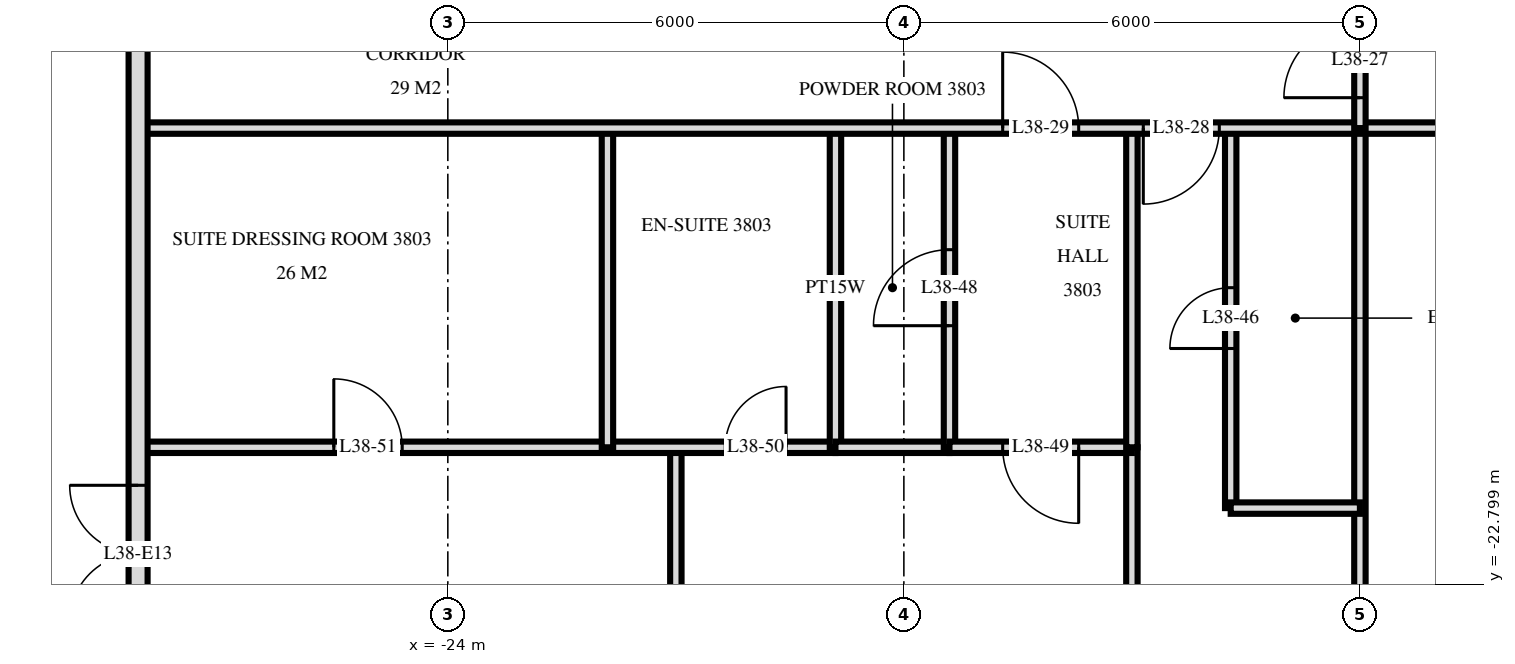
"""IFC4 building model, lengths in metres.
Left out: names, types, materials, properties, quantities, classifications, styles, units other than length and angle.
Written with IfcOpenShell. Run it as: python <this file> out.ifc"""

import sys

from ifc_helpers import new_model, si_unit, direction, frame, frame_2d, origin, place, context, subcontext, project, spatial, rectangle, extrude, element, fill, save


model = new_model("IFC4")
c1 = context("Model", 3, precision=1e-05, world=origin(), true_north=direction((0.0, 1.0)))
c2 = subcontext(c1, "Body", "Model", "MODEL_VIEW")
j1 = project(units=[si_unit("LENGTHUNIT", "METRE"), si_unit("PLANEANGLEUNIT", "RADIAN")], contexts=[c1])
p1 = place(None, origin())
s1 = spatial("IfcSite", under=j1, at=p1, CompositionType="ELEMENT")
p2 = place(p1, origin())
s2 = spatial("IfcBuilding", under=s1, at=p2, CompositionType="ELEMENT")
p3 = place(p2, frame((0.0, 0.0, 148.8)))
s3 = spatial("IfcBuildingStorey", under=s2, at=p3, CompositionType="ELEMENT", Elevation=148.8)
p4 = place(p3, frame((-28.075, -3.325, 0.0), z_axis=(0.0, 0.0, 1.0), x_axis=(0.0, -1.0, 0.0)))
e1 = element("IfcWall", 1, at=p4, inside=s3, PredefinedType="SOLIDWALL", context=c2, shape_type="SweptSolid", body=[
    extrude(rectangle(XDim=25.951, YDim=0.25, at=frame_2d((12.975, 0.0))), origin(), (0.0, 0.0, 1.0), 3.32),
])
p5 = place(p4, frame((7.275, 0.0, 0.0)))
e2 = element("IfcOpeningElement", 2, at=p5, cuts=e1, PredefinedType="OPENING", context=c2, shape_type="SweptSolid", body=[
    extrude(rectangle(XDim=1.8, YDim=2.4, at=frame_2d((0.9, 1.2))), frame((0.0, 0.135, 0.0), z_axis=(0.0, -1.0, 0.0), x_axis=(1.0, 0.0, 0.0)), (0.0, 0.0, 1.0), 0.27),
])
p6 = place(p4, frame((18.175, 0.0, 0.0)))
e3 = element("IfcOpeningElement", 3, at=p6, cuts=e1, PredefinedType="OPENING", context=c2, shape_type="SweptSolid", body=[
    extrude(rectangle(XDim=1.8, YDim=2.4, at=frame_2d((0.9, 1.2))), frame((0.0, 0.135, 0.0), z_axis=(0.0, -1.0, 0.0), x_axis=(1.0, 0.0, 0.0)), (0.0, 0.0, 1.0), 0.27),
])
p7 = place(p4, frame((21.075, 0.0, 0.0)))
e4 = element("IfcOpeningElement", 4, at=p7, cuts=e1, PredefinedType="OPENING", context=c2, shape_type="SweptSolid", body=[
    extrude(rectangle(XDim=1.8, YDim=2.4, at=frame_2d((0.9, 1.2))), frame((0.0, 0.135, 0.0), z_axis=(0.0, -1.0, 0.0), x_axis=(1.0, 0.0, 0.0)), (0.0, 0.0, 1.0), 0.27),
])
p8 = place(p4, frame((23.825, 0.0, 0.3)))
e5 = element("IfcOpeningElement", 5, at=p8, cuts=e1, PredefinedType="OPENING", context=c2, shape_type="SweptSolid", body=[
    extrude(rectangle(XDim=1.8, YDim=2.1, at=frame_2d((0.9, 1.05))), frame((0.0, 0.135, 0.0), z_axis=(0.0, -1.0, 0.0), x_axis=(1.0, 0.0, 0.0)), (0.0, 0.0, 1.0), 0.27),
])
p9 = place(p3, frame((-12.0, -16.8, 0.0), z_axis=(0.0, 0.0, 1.0), x_axis=(0.0, 1.0, 0.0)))
e6 = element("IfcWall", 6, at=p9, inside=s3, PredefinedType="PARTITIONING", context=c2, shape_type="SweptSolid", body=[
    extrude(rectangle(XDim=1.75, YDim=0.15, at=frame_2d((0.875, 0.0))), origin(), (0.0, 0.0, 1.0), 3.32),
])
p10 = place(p9, frame((0.4, 0.0, 0.0)))
e7 = element("IfcOpeningElement", 7, at=p10, cuts=e6, PredefinedType="OPENING", context=c2, shape_type="SweptSolid", body=[
    extrude(rectangle(XDim=1.0, YDim=2.1, at=frame_2d((0.5, 1.05))), frame((0.0, 0.085, 0.0), z_axis=(0.0, -1.0, 0.0), x_axis=(1.0, 0.0, 0.0)), (0.0, 0.0, 1.0), 0.17),
])
p11 = place(p3, frame((-12.0, -33.62, 0.0), z_axis=(0.0, 0.0, 1.0), x_axis=(0.0, 1.0, 0.0)))
e8 = element("IfcWall", 8, at=p11, inside=s3, PredefinedType="PARTITIONING", context=c2, shape_type="SweptSolid", body=[
    extrude(rectangle(XDim=16.82, YDim=0.15, at=frame_2d((8.41, 0.0))), origin(), (0.0, 0.0, 1.0), 3.32),
])
p12 = place(p3, frame((-13.7, -21.8, 0.0), z_axis=(0.0, 0.0, 1.0), x_axis=(0.0, 1.0, 0.0)))
e9 = element("IfcWall", 9, at=p12, inside=s3, PredefinedType="PARTITIONING", context=c2, shape_type="SweptSolid", body=[
    extrude(rectangle(XDim=5.0, YDim=0.15, at=frame_2d((2.5, 0.0))), origin(), (0.0, 0.0, 1.0), 3.32),
])
p13 = place(p12, frame((2.1, 0.0, 0.0)))
e10 = element("IfcOpeningElement", 10, at=p13, cuts=e9, PredefinedType="OPENING", context=c2, shape_type="SweptSolid", body=[
    extrude(rectangle(XDim=0.8, YDim=2.1, at=frame_2d((0.4, 1.05))), frame((0.0, 0.085, 0.0), z_axis=(0.0, -1.0, 0.0), x_axis=(1.0, 0.0, 0.0)), (0.0, 0.0, 1.0), 0.17),
])
p14 = place(p3, frame((-15.0, -21.0, 0.0), z_axis=(0.0, 0.0, 1.0), x_axis=(0.0, 1.0, 0.0)))
e11 = element("IfcWall", 11, at=p14, inside=s3, PredefinedType="PARTITIONING", context=c2, shape_type="SweptSolid", body=[
    extrude(rectangle(XDim=4.2, YDim=0.15, at=frame_2d((2.1, 0.0))), origin(), (0.0, 0.0, 1.0), 3.32),
])
p15 = place(p3, frame((-15.0, -33.62, 0.0), z_axis=(0.0, 0.0, 1.0), x_axis=(0.0, 1.0, 0.0)))
e12 = element("IfcWall", 12, at=p15, inside=s3, PredefinedType="PARTITIONING", context=c2, shape_type="SweptSolid", body=[
    extrude(rectangle(XDim=12.62, YDim=0.15, at=frame_2d((6.31, 0.0))), origin(), (0.0, 0.0, 1.0), 3.32),
])
p16 = place(p3, frame((-17.4, -21.0, 0.0), z_axis=(0.0, 0.0, 1.0), x_axis=(0.0, 1.0, 0.0)))
e13 = element("IfcWall", 13, at=p16, inside=s3, PredefinedType="PARTITIONING", context=c2, shape_type="SweptSolid", body=[
    extrude(rectangle(XDim=4.2, YDim=0.15, at=frame_2d((2.1, 0.0))), origin(), (0.0, 0.0, 1.0), 3.32),
])
p17 = place(p16, frame((1.6, 0.0, 0.0)))
e14 = element("IfcOpeningElement", 14, at=p17, cuts=e13, PredefinedType="OPENING", context=c2, shape_type="SweptSolid", body=[
    extrude(rectangle(XDim=1.0, YDim=2.1, at=frame_2d((0.5, 1.05))), frame((0.0, 0.085, 0.0), z_axis=(0.0, -1.0, 0.0), x_axis=(1.0, 0.0, 0.0)), (0.0, 0.0, 1.0), 0.17),
])
p18 = place(p3, frame((-18.9, -21.0, 0.0), z_axis=(0.0, 0.0, 1.0), x_axis=(0.0, 1.0, 0.0)))
e15 = element("IfcWall", 15, at=p18, inside=s3, PredefinedType="PLUMBINGWALL", context=c2, shape_type="SweptSolid", body=[
    extrude(rectangle(XDim=4.2, YDim=0.15, at=frame_2d((2.1, 0.0))), origin(), (0.0, 0.0, 1.0), 3.32),
])
p19 = place(p3, frame((-21.0, -33.62, 0.0), z_axis=(0.0, 0.0, 1.0), x_axis=(0.0, 1.0, 0.0)))
e16 = element("IfcWall", 16, at=p19, inside=s3, PredefinedType="PARTITIONING", context=c2, shape_type="SweptSolid", body=[
    extrude(rectangle(XDim=12.62, YDim=0.15, at=frame_2d((6.31, 0.0))), origin(), (0.0, 0.0, 1.0), 3.32),
])
p20 = place(p19, frame((5.77, 0.0, 0.0)))
e17 = element("IfcOpeningElement", 17, at=p20, cuts=e16, PredefinedType="OPENING", context=c2, shape_type="SweptSolid", body=[
    extrude(rectangle(XDim=0.9, YDim=2.1, at=frame_2d((0.45, 1.05))), frame((0.0, 0.085, 0.0), z_axis=(0.0, -1.0, 0.0), x_axis=(1.0, 0.0, 0.0)), (0.0, 0.0, 1.0), 0.17),
])
p21 = place(p3, frame((-21.9, -21.0, 0.0), z_axis=(0.0, 0.0, 1.0), x_axis=(0.0, 1.0, 0.0)))
e18 = element("IfcWall", 18, at=p21, inside=s3, PredefinedType="PARTITIONING", context=c2, shape_type="SweptSolid", body=[
    extrude(rectangle(XDim=4.2, YDim=0.15, at=frame_2d((2.1, 0.0))), origin(), (0.0, 0.0, 1.0), 3.32),
])
p22 = place(p3, frame((-13.7, -21.8, 0.0), z_axis=(0.0, 0.0, 1.0), x_axis=(1.0, 0.0, 0.0)))
e19 = element("IfcWall", 19, at=p22, inside=s3, PredefinedType="PARTITIONING", context=c2, shape_type="SweptSolid", body=[
    extrude(rectangle(XDim=1.7, YDim=0.15, at=frame_2d((0.85, 0.0))), origin(), (0.0, 0.0, 1.0), 3.32),
])
p23 = place(p3, frame((-17.4, -21.0, 0.0), z_axis=(0.0, 0.0, 1.0), x_axis=(1.0, 0.0, 0.0)))
e20 = element("IfcWall", 20, at=p23, inside=s3, PredefinedType="PARTITIONING", context=c2, shape_type="SweptSolid", body=[
    extrude(rectangle(XDim=2.4, YDim=0.15, at=frame_2d((1.2, 0.0))), origin(), (0.0, 0.0, 1.0), 3.32),
])
p24 = place(p23, frame((0.7, 0.0, 0.0)))
e21 = element("IfcOpeningElement", 21, at=p24, cuts=e20, PredefinedType="OPENING", context=c2, shape_type="SweptSolid", body=[
    extrude(rectangle(XDim=1.0, YDim=2.1, at=frame_2d((0.5, 1.05))), frame((0.0, 0.085, 0.0), z_axis=(0.0, -1.0, 0.0), x_axis=(1.0, 0.0, 0.0)), (0.0, 0.0, 1.0), 0.17),
])
p25 = place(p3, frame((-28.02, -21.0, 0.0), z_axis=(0.0, 0.0, 1.0), x_axis=(1.0, 0.0, 0.0)))
e22 = element("IfcWall", 22, at=p25, inside=s3, PredefinedType="PARTITIONING", context=c2, shape_type="SweptSolid", body=[
    extrude(rectangle(XDim=9.12, YDim=0.15, at=frame_2d((4.56, 0.0))), origin(), (0.0, 0.0, 1.0), 3.32),
])
p26 = place(p25, frame((7.67, 0.0, 0.0)))
e23 = element("IfcOpeningElement", 23, at=p26, cuts=e22, PredefinedType="OPENING", context=c2, shape_type="SweptSolid", body=[
    extrude(rectangle(XDim=0.8, YDim=2.1, at=frame_2d((0.4, 1.05))), frame((0.0, 0.085, 0.0), z_axis=(0.0, -1.0, 0.0), x_axis=(1.0, 0.0, 0.0)), (0.0, 0.0, 1.0), 0.17),
])
p27 = place(p25, frame((2.52, 0.0, 0.0)))
e24 = element("IfcOpeningElement", 24, at=p27, cuts=e22, PredefinedType="OPENING", context=c2, shape_type="SweptSolid", body=[
    extrude(rectangle(XDim=0.9, YDim=2.1, at=frame_2d((0.45, 1.05))), frame((0.0, 0.085, 0.0), z_axis=(0.0, -1.0, 0.0), x_axis=(1.0, 0.0, 0.0)), (0.0, 0.0, 1.0), 0.17),
])
p28 = place(p3, frame((-18.9, -21.0, 0.0), z_axis=(0.0, 0.0, 1.0), x_axis=(1.0, 0.0, 0.0)))
e25 = element("IfcWall", 25, at=p28, inside=s3, PredefinedType="PLUMBINGWALL", context=c2, shape_type="SweptSolid", body=[
    extrude(rectangle(XDim=1.5, YDim=0.15, at=frame_2d((0.75, 0.0))), origin(), (0.0, 0.0, 1.0), 3.32),
])
p29 = place(p3, frame((-28.02, -16.8, 0.0), z_axis=(0.0, 0.0, 1.0), x_axis=(1.0, 0.0, 0.0)))
e26 = element("IfcWall", 26, at=p29, inside=s3, PredefinedType="PARTITIONING", context=c2, shape_type="SweptSolid", body=[
    extrude(rectangle(XDim=56.04, YDim=0.15, at=frame_2d((28.02, 0.0))), origin(), (0.0, 0.0, 1.0), 3.32),
])
p30 = place(p29, frame((13.17, 0.0, 0.0)))
e27 = element("IfcOpeningElement", 27, at=p30, cuts=e26, PredefinedType="OPENING", context=c2, shape_type="SweptSolid", body=[
    extrude(rectangle(XDim=1.0, YDim=2.1, at=frame_2d((0.5, 1.05))), frame((0.0, 0.085, 0.0), z_axis=(0.0, -1.0, 0.0), x_axis=(1.0, 0.0, 0.0)), (0.0, 0.0, 1.0), 0.17),
])
p31 = place(p29, frame((11.32, 0.0, 0.0)))
e28 = element("IfcOpeningElement", 28, at=p31, cuts=e26, PredefinedType="OPENING", context=c2, shape_type="SweptSolid", body=[
    extrude(rectangle(XDim=1.0, YDim=2.1, at=frame_2d((0.5, 1.05))), frame((0.0, 0.085, 0.0), z_axis=(0.0, -1.0, 0.0), x_axis=(1.0, 0.0, 0.0)), (0.0, 0.0, 1.0), 0.17),
])
p32 = place(p29, frame((41.87, 0.0, 0.0)))
e29 = element("IfcOpeningElement", 29, at=p32, cuts=e26, PredefinedType="OPENING", context=c2, shape_type="SweptSolid", body=[
    extrude(rectangle(XDim=1.0, YDim=2.1, at=frame_2d((0.5, 1.05))), frame((0.0, 0.085, 0.0), z_axis=(0.0, -1.0, 0.0), x_axis=(1.0, 0.0, 0.0)), (0.0, 0.0, 1.0), 0.17),
])
p33 = place(p29, frame((43.72, 0.0, 0.0)))
e30 = element("IfcOpeningElement", 30, at=p33, cuts=e26, PredefinedType="OPENING", context=c2, shape_type="SweptSolid", body=[
    extrude(rectangle(XDim=1.0, YDim=2.1, at=frame_2d((0.5, 1.05))), frame((0.0, 0.085, 0.0), z_axis=(0.0, -1.0, 0.0), x_axis=(1.0, 0.0, 0.0)), (0.0, 0.0, 1.0), 0.17),
])
p34 = place(p29, frame((19.52, 0.0, 0.0)))
e31 = element("IfcOpeningElement", 31, at=p34, cuts=e26, PredefinedType="OPENING", context=c2, shape_type="SweptSolid", body=[
    extrude(rectangle(XDim=1.0, YDim=2.1, at=frame_2d((0.5, 1.05))), frame((0.0, 0.085, 0.0), z_axis=(0.0, -1.0, 0.0), x_axis=(1.0, 0.0, 0.0)), (0.0, 0.0, 1.0), 0.17),
])
p35 = place(p29, frame((27.52, 0.0, 0.0)))
e32 = element("IfcOpeningElement", 32, at=p35, cuts=e26, PredefinedType="OPENING", context=c2, shape_type="SweptSolid", body=[
    extrude(rectangle(XDim=1.0, YDim=2.1, at=frame_2d((0.5, 1.05))), frame((0.0, 0.085, 0.0), z_axis=(0.0, -1.0, 0.0), x_axis=(1.0, 0.0, 0.0)), (0.0, 0.0, 1.0), 0.17),
])
p36 = place(p29, frame((35.52, 0.0, 0.0)))
e33 = element("IfcOpeningElement", 33, at=p36, cuts=e26, PredefinedType="OPENING", context=c2, shape_type="SweptSolid", body=[
    extrude(rectangle(XDim=1.0, YDim=2.1, at=frame_2d((0.5, 1.05))), frame((0.0, 0.085, 0.0), z_axis=(0.0, -1.0, 0.0), x_axis=(1.0, 0.0, 0.0)), (0.0, 0.0, 1.0), 0.17),
])
p37 = place(p6, frame((0.9, 0.0, 0.0), z_axis=(0.0, 0.0, 1.0), x_axis=(-1.0, 0.0, 0.0)))
e34 = element("IfcDoor", 34, at=p37, inside=s3, OperationType="DOUBLE_DOOR_SINGLE_SWING", PredefinedType="DOOR", context=c2, shape_type="SweptSolid", body=[
    extrude(rectangle(XDim=1.8, YDim=2.4, at=frame_2d((0.0, 1.2))), frame((0.0, -0.025, 0.0), z_axis=(0.0, 1.0, 0.0), x_axis=(-1.0, 0.0, 0.0)), (0.0, 0.0, 1.0), 0.05),
])
fill(e3, e34)
p38 = place(p10, origin())
e35 = element("IfcDoor", 35, at=p38, inside=s3, OperationType="SINGLE_SWING_RIGHT", PredefinedType="DOOR", context=c2, shape_type="SweptSolid", body=[
    extrude(rectangle(XDim=1.0, YDim=2.1, at=frame_2d((0.5, 1.05))), frame((0.0, 0.025, 0.0), z_axis=(0.0, -1.0, 0.0), x_axis=(1.0, 0.0, 0.0)), (0.0, 0.0, 1.0), 0.05),
])
fill(e7, e35)
p39 = place(p30, frame((0.5, 0.0, 0.0), z_axis=(0.0, 0.0, 1.0), x_axis=(-1.0, 0.0, 0.0)))
e36 = element("IfcDoor", 36, at=p39, inside=s3, OperationType="SINGLE_SWING_LEFT", PredefinedType="DOOR", context=c2, shape_type="SweptSolid", body=[
    extrude(rectangle(XDim=1.0, YDim=2.1, at=frame_2d((0.0, 1.05))), frame((0.0, -0.025, 0.0), z_axis=(0.0, 1.0, 0.0), x_axis=(-1.0, 0.0, 0.0)), (0.0, 0.0, 1.0), 0.05),
])
fill(e27, e36)
p40 = place(p31, origin())
e37 = element("IfcDoor", 37, at=p40, inside=s3, OperationType="SINGLE_SWING_RIGHT", PredefinedType="DOOR", context=c2, shape_type="SweptSolid", body=[
    extrude(rectangle(XDim=1.0, YDim=2.1, at=frame_2d((0.5, 1.05))), frame((0.0, 0.025, 0.0), z_axis=(0.0, -1.0, 0.0), x_axis=(1.0, 0.0, 0.0)), (0.0, 0.0, 1.0), 0.05),
])
fill(e28, e37)
p41 = place(p13, origin())
e38 = element("IfcDoor", 38, at=p41, inside=s3, OperationType="SINGLE_SWING_RIGHT", PredefinedType="DOOR", context=c2, shape_type="SweptSolid", body=[
    extrude(rectangle(XDim=0.8, YDim=2.1, at=frame_2d((0.4, 1.05))), frame((0.0, 0.025, 0.0), z_axis=(0.0, -1.0, 0.0), x_axis=(1.0, 0.0, 0.0)), (0.0, 0.0, 1.0), 0.05),
])
fill(e10, e38)
p42 = place(p17, origin())
e39 = element("IfcDoor", 39, at=p42, inside=s3, OperationType="SINGLE_SWING_RIGHT", PredefinedType="DOOR", context=c2, shape_type="SweptSolid", body=[
    extrude(rectangle(XDim=1.0, YDim=2.1, at=frame_2d((0.5, 1.05))), frame((0.0, 0.025, 0.0), z_axis=(0.0, -1.0, 0.0), x_axis=(1.0, 0.0, 0.0)), (0.0, 0.0, 1.0), 0.05),
])
fill(e14, e39)
p43 = place(p24, frame((0.5, 0.0, 0.0), z_axis=(0.0, 0.0, 1.0), x_axis=(-1.0, 0.0, 0.0)))
e40 = element("IfcDoor", 40, at=p43, inside=s3, OperationType="SINGLE_SWING_RIGHT", PredefinedType="DOOR", context=c2, shape_type="SweptSolid", body=[
    extrude(rectangle(XDim=1.0, YDim=2.1, at=frame_2d((0.0, 1.05))), frame((0.0, -0.025, 0.0), z_axis=(0.0, 1.0, 0.0), x_axis=(-1.0, 0.0, 0.0)), (0.0, 0.0, 1.0), 0.05),
])
fill(e21, e40)
p44 = place(p26, origin())
e41 = element("IfcDoor", 41, at=p44, inside=s3, OperationType="SINGLE_SWING_LEFT", PredefinedType="DOOR", context=c2, shape_type="SweptSolid", body=[
    extrude(rectangle(XDim=0.8, YDim=2.1, at=frame_2d((0.4, 1.05))), frame((0.0, 0.025, 0.0), z_axis=(0.0, -1.0, 0.0), x_axis=(1.0, 0.0, 0.0)), (0.0, 0.0, 1.0), 0.05),
])
fill(e23, e41)
p45 = place(p27, origin())
e42 = element("IfcDoor", 42, at=p45, inside=s3, OperationType="SINGLE_SWING_RIGHT", PredefinedType="DOOR", context=c2, shape_type="SweptSolid", body=[
    extrude(rectangle(XDim=0.9, YDim=2.1, at=frame_2d((0.45, 1.05))), frame((0.0, 0.025, 0.0), z_axis=(0.0, -1.0, 0.0), x_axis=(1.0, 0.0, 0.0)), (0.0, 0.0, 1.0), 0.05),
])
fill(e24, e42)
save(model, sys.argv[1])
